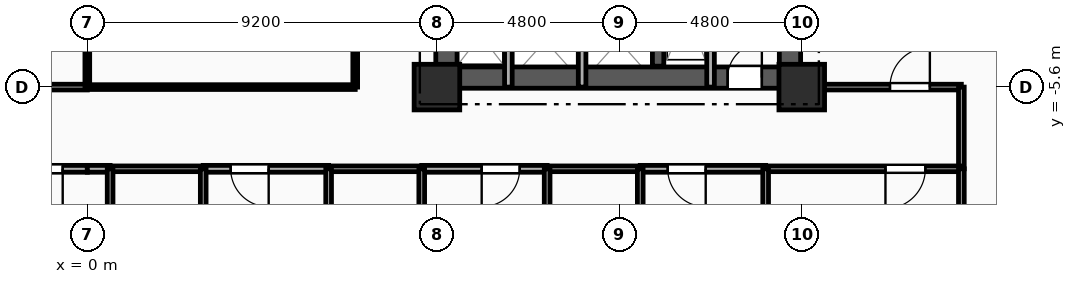
"""IFC4 building model, lengths in metres.
Left out: names, types, materials, properties, quantities, classifications, styles, units other than length and angle.
Written with IfcOpenShell. Run it as: python <this file> out.ifc"""

import sys

from ifc_helpers import new_model, si_unit, direction, frame, frame_2d, origin, origin_2d, place, context, subcontext, project, spatial, rectangle, extrude, element, fill, save


model = new_model("IFC4")
c1 = context("Model", 3, precision=1e-05, world=origin(), true_north=direction((0.0, 1.0)))
c2 = subcontext(c1, "Body", "Model", "MODEL_VIEW")
j1 = project(units=[si_unit("LENGTHUNIT", "METRE"), si_unit("PLANEANGLEUNIT", "RADIAN")], contexts=[c1])
p1 = place(None, origin())
s1 = spatial("IfcSite", under=j1, at=p1, CompositionType="ELEMENT")
p2 = place(p1, origin())
s2 = spatial("IfcBuilding", under=s1, at=p2, CompositionType="ELEMENT")
p3 = place(p2, frame((0.0, 0.0, 70.55)))
s3 = spatial("IfcBuildingStorey", under=s2, at=p3, CompositionType="ELEMENT", Elevation=70.55)
for number, where, z_axis, x_axis in (
    (1, (9.2, -5.6, 0.0), (0.0, 0.0, 1.0), (1.0, 0.0, 0.0)),
    (2, (18.8, -5.6, 0.0), (0.0, 0.0, 1.0), (1.0, 0.0, 0.0)),
):
    element("IfcColumn", number, at=place(p3, frame(where, z_axis=z_axis, x_axis=x_axis)), inside=s3, PredefinedType="COLUMN", context=c2, shape_type="SweptSolid", body=[
        extrude(rectangle(XDim=1.2, YDim=1.2, at=origin_2d()), origin(), (0.0, 0.0, 1.0), 3.35),
    ])
p4 = place(p3, frame((9.2, -5.35, 0.0), z_axis=(0.0, 0.0, 1.0), x_axis=(1.0, 0.0, 0.0)))
e3 = element("IfcWall", 3, at=p4, inside=s3, PredefinedType="SHEAR", context=c2, shape_type="SweptSolid", body=[
    extrude(rectangle(XDim=9.6, YDim=0.56, at=frame_2d((4.8, 0.0))), origin(), (0.0, 0.0, 1.0), 3.0),
])
p5 = place(p4, frame((7.65, 0.0, 0.0)))
e4 = element("IfcOpeningElement", 4, at=p5, cuts=e3, PredefinedType="OPENING", context=c2, shape_type="SweptSolid", body=[
    extrude(rectangle(XDim=0.9, YDim=2.1, at=frame_2d((0.45, 1.05))), frame((0.0, 0.29, 0.0), z_axis=(0.0, -1.0, 0.0), x_axis=(1.0, 0.0, 0.0)), (0.0, 0.0, 1.0), 0.58),
])
p6 = place(p3, frame((9.45, -5.05, 0.0), z_axis=(0.0, 0.0, 1.0), x_axis=(0.0, 1.0, 0.0)))
e5 = element("IfcWall", 5, at=p6, inside=s3, PredefinedType="SHEAR", context=c2, shape_type="SweptSolid", body=[
    extrude(rectangle(XDim=10.1, YDim=0.56, at=frame_2d((5.05, 0.0))), origin(), (0.0, 0.0, 1.0), 3.0),
])
p7 = place(p6, frame((7.15, 0.0, 0.0)))
e6 = element("IfcOpeningElement", 6, at=p7, cuts=e5, PredefinedType="OPENING", context=c2, shape_type="SweptSolid", body=[
    extrude(rectangle(XDim=0.9, YDim=2.1, at=frame_2d((0.45, 1.05))), frame((0.0, 0.29, 0.0), z_axis=(0.0, -1.0, 0.0), x_axis=(1.0, 0.0, 0.0)), (0.0, 0.0, 1.0), 0.58),
])
p8 = place(p6, frame((2.4, 0.0, 0.0)))
e7 = element("IfcOpeningElement", 7, at=p8, cuts=e5, PredefinedType="OPENING", context=c2, shape_type="SweptSolid", body=[
    extrude(rectangle(XDim=1.2, YDim=2.15, at=frame_2d((0.6, 1.075))), frame((0.0, 0.29, 0.0), z_axis=(0.0, -1.0, 0.0), x_axis=(1.0, 0.0, 0.0)), (0.0, 0.0, 1.0), 0.58),
])
p9 = place(p3, frame((18.49, -5.05, 0.0), z_axis=(0.0, 0.0, 1.0), x_axis=(0.0, 1.0, 0.0)))
e8 = element("IfcWall", 8, at=p9, inside=s3, PredefinedType="SHEAR", context=c2, shape_type="SweptSolid", body=[
    extrude(rectangle(XDim=10.1, YDim=0.56, at=frame_2d((5.05, 0.0))), origin(), (0.0, 0.0, 1.0), 3.0),
])
p10 = place(p3, frame((15.02, -5.05, 0.0), z_axis=(0.0, 0.0, 1.0), x_axis=(0.0, 1.0, 0.0)))
e9 = element("IfcWall", 9, at=p10, inside=s3, PredefinedType="SHEAR", context=c2, shape_type="SweptSolid", body=[
    extrude(rectangle(XDim=10.1, YDim=0.3, at=frame_2d((5.05, 0.0))), origin(), (0.0, 0.0, 1.0), 3.0),
])
p11 = place(p3, frame((16.4, -2.11, 0.0), z_axis=(0.0, 0.0, 1.0), x_axis=(0.0, -1.0, 0.0)))
e10 = element("IfcWall", 10, at=p11, inside=s3, PredefinedType="PARTITIONING", context=c2, shape_type="SweptSolid", body=[
    extrude(rectangle(XDim=3.49, YDim=0.2, at=frame_2d((1.745, 0.0))), origin(), (0.0, 0.0, 1.0), 3.0),
])
for number, where, z_axis, x_axis in (
    (11, (11.08, -5.6, 0.0), (0.0, 0.0, 1.0), (0.0, 1.0, 0.0)),
    (12, (13.02, -5.6, 0.0), (0.0, 0.0, 1.0), (0.0, 1.0, 0.0)),
):
    element("IfcWall", number, at=place(p3, frame(where, z_axis=z_axis, x_axis=x_axis)), inside=s3, PredefinedType="PARTITIONING", context=c2, shape_type="SweptSolid", body=[
        extrude(rectangle(XDim=2.25, YDim=0.2, at=frame_2d((1.125, 0.0))), origin(), (0.0, 0.0, 1.0), 3.0),
    ])
p12 = place(p3, frame((0.0, -7.75, 0.0), z_axis=(0.0, 0.0, 1.0), x_axis=(-1.0, 0.0, 0.0)))
e13 = element("IfcWall", 13, at=p12, inside=s3, PredefinedType="PARTITIONING", context=c2, shape_type="SweptSolid", body=[
    extrude(rectangle(XDim=2.7, YDim=0.18, at=frame_2d((1.35, 0.0))), origin(), (0.0, 0.0, 1.0), 3.0),
])
p13 = place(p12, frame((0.647, 0.0, 0.0)))
e14 = element("IfcOpeningElement", 14, at=p13, cuts=e13, PredefinedType="OPENING", context=c2, shape_type="SweptSolid", body=[
    extrude(rectangle(XDim=1.0, YDim=2.15, at=frame_2d((0.5, 1.075))), frame((0.0, 0.1, 0.0), z_axis=(0.0, -1.0, 0.0), x_axis=(1.0, 0.0, 0.0)), (0.0, 0.0, 1.0), 0.2),
])
p14 = place(p3, frame((-7.05, -5.6, 0.0), z_axis=(0.0, 0.0, 1.0), x_axis=(1.0, 0.0, 0.0)))
e15 = element("IfcWall", 15, at=p14, inside=s3, PredefinedType="PARTITIONING", context=c2, shape_type="SweptSolid", body=[
    extrude(rectangle(XDim=7.05, YDim=0.15, at=frame_2d((3.525, 0.0))), origin(), (0.0, 0.0, 1.0), 2.485),
])
p15 = place(p3, frame((18.8, -5.6, 0.0), z_axis=(0.0, 0.0, 1.0), x_axis=(1.0, 0.0, 0.0)))
e16 = element("IfcWall", 16, at=p15, inside=s3, PredefinedType="PARTITIONING", context=c2, shape_type="SweptSolid", body=[
    extrude(rectangle(XDim=4.2, YDim=0.15, at=frame_2d((2.1, 0.0))), origin(), (0.0, 0.0, 1.0), 3.0),
])
p16 = place(p15, frame((2.321, 0.0, 0.0)))
e17 = element("IfcOpeningElement", 17, at=p16, cuts=e16, PredefinedType="OPENING", context=c2, shape_type="SweptSolid", body=[
    extrude(rectangle(XDim=1.05, YDim=2.15, at=frame_2d((0.525, 1.075))), frame((0.0, 0.085, 0.0), z_axis=(0.0, -1.0, 0.0), x_axis=(1.0, 0.0, 0.0)), (0.0, 0.0, 1.0), 0.17),
])
p17 = place(p3, frame((23.0, -5.6, 0.0), z_axis=(0.0, 0.0, 1.0), x_axis=(0.0, -1.0, 0.0)))
e18 = element("IfcWall", 18, at=p17, inside=s3, PredefinedType="PARTITIONING", context=c2, shape_type="SweptSolid", body=[
    extrude(rectangle(XDim=2.15, YDim=0.15, at=frame_2d((1.075, 0.0))), origin(), (0.0, 0.0, 1.0), 3.0),
])
p18 = place(p3, frame((0.6, -7.75, 0.0), z_axis=(0.0, 0.0, 1.0), x_axis=(-1.0, 0.0, 0.0)))
e19 = element("IfcWall", 19, at=p18, inside=s3, PredefinedType="PARTITIONING", context=c2, shape_type="SweptSolid", body=[
    extrude(rectangle(XDim=0.6, YDim=0.18, at=frame_2d((0.3, 0.0))), origin(), (0.0, 0.0, 1.0), 3.0),
])
p19 = place(p3, frame((6.35, -7.75, 0.0), z_axis=(0.0, 0.0, 1.0), x_axis=(-1.0, 0.0, 0.0)))
e20 = element("IfcWall", 20, at=p19, inside=s3, PredefinedType="PARTITIONING", context=c2, shape_type="SweptSolid", body=[
    extrude(rectangle(XDim=3.3, YDim=0.18, at=frame_2d((1.65, 0.0))), origin(), (0.0, 0.0, 1.0), 3.0),
])
p20 = place(p19, frame((1.577, 0.0, 0.0)))
e21 = element("IfcOpeningElement", 21, at=p20, cuts=e20, PredefinedType="OPENING", context=c2, shape_type="SweptSolid", body=[
    extrude(rectangle(XDim=1.0, YDim=2.15, at=frame_2d((0.5, 1.075))), frame((0.0, 0.1, 0.0), z_axis=(0.0, -1.0, 0.0), x_axis=(1.0, 0.0, 0.0)), (0.0, 0.0, 1.0), 0.2),
])
p21 = place(p3, frame((3.05, -7.75, 0.0), z_axis=(0.0, 0.0, 1.0), x_axis=(-1.0, 0.0, 0.0)))
e22 = element("IfcWall", 22, at=p21, inside=s3, PredefinedType="PLUMBINGWALL", context=c2, shape_type="SweptSolid", body=[
    extrude(rectangle(XDim=2.45, YDim=0.15, at=frame_2d((1.225, 0.0))), origin(), (0.0, 0.0, 1.0), 3.0),
])
p22 = place(p3, frame((12.1, -7.75, 0.0), z_axis=(0.0, 0.0, 1.0), x_axis=(-1.0, 0.0, 0.0)))
e23 = element("IfcWall", 23, at=p22, inside=s3, PredefinedType="PARTITIONING", context=c2, shape_type="SweptSolid", body=[
    extrude(rectangle(XDim=3.3, YDim=0.18, at=frame_2d((1.65, 0.0))), origin(), (0.0, 0.0, 1.0), 3.0),
])
p23 = place(p22, frame((0.722, 0.0, 0.0)))
e24 = element("IfcOpeningElement", 24, at=p23, cuts=e23, PredefinedType="OPENING", context=c2, shape_type="SweptSolid", body=[
    extrude(rectangle(XDim=1.0, YDim=2.15, at=frame_2d((0.5, 1.075))), frame((0.0, 0.1, 0.0), z_axis=(0.0, -1.0, 0.0), x_axis=(1.0, 0.0, 0.0)), (0.0, 0.0, 1.0), 0.2),
])
p24 = place(p3, frame((8.8, -7.75, 0.0), z_axis=(0.0, 0.0, 1.0), x_axis=(-1.0, 0.0, 0.0)))
e25 = element("IfcWall", 25, at=p24, inside=s3, PredefinedType="PLUMBINGWALL", context=c2, shape_type="SweptSolid", body=[
    extrude(rectangle(XDim=2.45, YDim=0.15, at=frame_2d((1.225, 0.0))), origin(), (0.0, 0.0, 1.0), 3.0),
])
p25 = place(p3, frame((17.85, -7.75, 0.0), z_axis=(0.0, 0.0, 1.0), x_axis=(-1.0, 0.0, 0.0)))
e26 = element("IfcWall", 26, at=p25, inside=s3, PredefinedType="PARTITIONING", context=c2, shape_type="SweptSolid", body=[
    extrude(rectangle(XDim=3.3, YDim=0.18, at=frame_2d((1.65, 0.0))), origin(), (0.0, 0.0, 1.0), 3.0),
])
p26 = place(p25, frame((1.577, 0.0, 0.0)))
e27 = element("IfcOpeningElement", 27, at=p26, cuts=e26, PredefinedType="OPENING", context=c2, shape_type="SweptSolid", body=[
    extrude(rectangle(XDim=1.0, YDim=2.15, at=frame_2d((0.5, 1.075))), frame((0.0, 0.1, 0.0), z_axis=(0.0, -1.0, 0.0), x_axis=(1.0, 0.0, 0.0)), (0.0, 0.0, 1.0), 0.2),
])
p27 = place(p3, frame((14.55, -7.75, 0.0), z_axis=(0.0, 0.0, 1.0), x_axis=(-1.0, 0.0, 0.0)))
e28 = element("IfcWall", 28, at=p27, inside=s3, PredefinedType="PLUMBINGWALL", context=c2, shape_type="SweptSolid", body=[
    extrude(rectangle(XDim=2.45, YDim=0.15, at=frame_2d((1.225, 0.0))), origin(), (0.0, 0.0, 1.0), 3.0),
])
p28 = place(p3, frame((23.0, -7.75, 0.0), z_axis=(0.0, 0.0, 1.0), x_axis=(-1.0, 0.0, 0.0)))
e29 = element("IfcWall", 29, at=p28, inside=s3, PredefinedType="PARTITIONING", context=c2, shape_type="SweptSolid", body=[
    extrude(rectangle(XDim=5.15, YDim=0.15, at=frame_2d((2.575, 0.0))), origin(), (0.0, 0.0, 1.0), 3.0),
])
p29 = place(p28, frame((0.948, 0.0, 0.0)))
e30 = element("IfcOpeningElement", 30, at=p29, cuts=e29, PredefinedType="OPENING", context=c2, shape_type="SweptSolid", body=[
    extrude(rectangle(XDim=1.05, YDim=2.15, at=frame_2d((0.525, 1.075))), frame((0.0, 0.085, 0.0), z_axis=(0.0, -1.0, 0.0), x_axis=(1.0, 0.0, 0.0)), (0.0, 0.0, 1.0), 0.17),
])
p30 = place(p3, frame((0.0, -5.6, 0.0), z_axis=(0.0, 0.0, 1.0), x_axis=(1.0, 0.0, 0.0)))
e31 = element("IfcWall", 31, at=p30, inside=s3, PredefinedType="PARTITIONING", context=c2, shape_type="SweptSolid", body=[
    extrude(rectangle(XDim=7.05, YDim=0.125, at=frame_2d((3.525, 0.0))), origin(), (0.0, 0.0, 1.0), 2.485),
])
p31 = place(p3, frame((7.05, -5.6, 0.0), z_axis=(0.0, 0.0, 1.0), x_axis=(0.0, 1.0, 0.0)))
e32 = element("IfcWall", 32, at=p31, inside=s3, PredefinedType="PARTITIONING", context=c2, shape_type="SweptSolid", body=[
    extrude(rectangle(XDim=14.1, YDim=0.125, at=frame_2d((7.05, 0.0))), origin(), (0.0, 0.0, 1.0), 3.0),
])
p32 = place(p31, frame((5.076, 0.0, 0.0)))
e33 = element("IfcOpeningElement", 33, at=p32, cuts=e32, PredefinedType="OPENING", context=c2, shape_type="SweptSolid", body=[
    extrude(rectangle(XDim=0.95, YDim=2.1, at=frame_2d((0.475, 1.05))), frame((0.0, 0.073, 0.0), z_axis=(0.0, -1.0, 0.0), x_axis=(1.0, 0.0, 0.0)), (0.0, 0.0, 1.0), 0.145),
])
p33 = place(p3, frame((23.0, -19.4, 0.0), z_axis=(0.0, 0.0, 1.0), x_axis=(0.0, 1.0, 0.0)))
e34 = element("IfcWall", 34, at=p33, inside=s3, PredefinedType="PARTITIONING", context=c2, shape_type="SweptSolid", body=[
    extrude(rectangle(XDim=11.65, YDim=0.15, at=frame_2d((5.825, 0.0))), origin(), (0.0, 0.0, 1.0), 3.0),
])
for number, where, z_axis, x_axis in (
    (35, (0.6, -7.75, 0.0), (0.0, 0.0, 1.0), (0.0, -1.0, 0.0)),
    (36, (3.05, -9.9, 0.0), (0.0, 0.0, 1.0), (0.0, 1.0, 0.0)),
    (37, (6.35, -7.75, 0.0), (0.0, 0.0, 1.0), (0.0, -1.0, 0.0)),
    (38, (8.8, -9.9, 0.0), (0.0, 0.0, 1.0), (0.0, 1.0, 0.0)),
    (39, (12.1, -7.75, 0.0), (0.0, 0.0, 1.0), (0.0, -1.0, 0.0)),
    (40, (14.55, -9.9, 0.0), (0.0, 0.0, 1.0), (0.0, 1.0, 0.0)),
):
    element("IfcWall", number, at=place(p3, frame(where, z_axis=z_axis, x_axis=x_axis)), inside=s3, PredefinedType="PLUMBINGWALL", context=c2, shape_type="SweptSolid", body=[
        extrude(rectangle(XDim=2.15, YDim=0.15, at=frame_2d((1.075, 0.0))), origin(), (0.0, 0.0, 1.0), 3.0),
    ])
p34 = place(p3, frame((17.85, -7.75, 0.0), z_axis=(0.0, 0.0, 1.0), x_axis=(0.0, -1.0, 0.0)))
e41 = element("IfcWall", 41, at=p34, inside=s3, PredefinedType="PARTITIONING", context=c2, shape_type="SweptSolid", body=[
    extrude(rectangle(XDim=11.65, YDim=0.15, at=frame_2d((5.825, 0.0))), origin(), (0.0, 0.0, 1.0), 3.0),
])
p35 = place(p3, frame((0.0, 8.5, 0.0), z_axis=(0.0, 0.0, 1.0), x_axis=(0.0, -1.0, 0.0)))
e42 = element("IfcWall", 42, at=p35, inside=s3, PredefinedType="PARTITIONING", context=c2, shape_type="SweptSolid", body=[
    extrude(rectangle(XDim=14.1, YDim=0.125, at=frame_2d((7.05, 0.0))), origin(), (0.0, 0.0, 1.0), 3.0),
])
p36 = place(p5, origin())
e43 = element("IfcDoor", 43, at=p36, inside=s3, OperationType="SINGLE_SWING_RIGHT", PredefinedType="DOOR", context=c2, shape_type="SweptSolid", body=[
    extrude(rectangle(XDim=0.9, YDim=2.1, at=frame_2d((0.45, 1.05))), frame((0.0, 0.025, 0.0), z_axis=(0.0, -1.0, 0.0), x_axis=(1.0, 0.0, 0.0)), (0.0, 0.0, 1.0), 0.05),
])
fill(e4, e43)
p37 = place(p13, origin())
e44 = element("IfcDoor", 44, at=p37, inside=s3, OperationType="SINGLE_SWING_LEFT", PredefinedType="DOOR", context=c2, shape_type="SweptSolid", body=[
    extrude(rectangle(XDim=1.0, YDim=2.15, at=frame_2d((0.5, 1.075))), frame((0.0, 0.025, 0.0), z_axis=(0.0, -1.0, 0.0), x_axis=(1.0, 0.0, 0.0)), (0.0, 0.0, 1.0), 0.05),
])
fill(e14, e44)
p38 = place(p16, origin())
e45 = element("IfcDoor", 45, at=p38, inside=s3, OperationType="SINGLE_SWING_RIGHT", PredefinedType="DOOR", context=c2, shape_type="SweptSolid", body=[
    extrude(rectangle(XDim=1.05, YDim=2.15, at=frame_2d((0.525, 1.075))), frame((0.0, 0.025, 0.0), z_axis=(0.0, -1.0, 0.0), x_axis=(1.0, 0.0, 0.0)), (0.0, 0.0, 1.0), 0.05),
])
fill(e17, e45)
p39 = place(p20, origin())
e46 = element("IfcDoor", 46, at=p39, inside=s3, OperationType="SINGLE_SWING_LEFT", PredefinedType="DOOR", context=c2, shape_type="SweptSolid", body=[
    extrude(rectangle(XDim=1.0, YDim=2.15, at=frame_2d((0.5, 1.075))), frame((0.0, 0.025, 0.0), z_axis=(0.0, -1.0, 0.0), x_axis=(1.0, 0.0, 0.0)), (0.0, 0.0, 1.0), 0.05),
])
fill(e21, e46)
p40 = place(p23, origin())
e47 = element("IfcDoor", 47, at=p40, inside=s3, OperationType="SINGLE_SWING_RIGHT", PredefinedType="DOOR", context=c2, shape_type="SweptSolid", body=[
    extrude(rectangle(XDim=1.0, YDim=2.15, at=frame_2d((0.5, 1.075))), frame((0.0, 0.025, 0.0), z_axis=(0.0, -1.0, 0.0), x_axis=(1.0, 0.0, 0.0)), (0.0, 0.0, 1.0), 0.05),
])
fill(e24, e47)
p41 = place(p26, origin())
e48 = element("IfcDoor", 48, at=p41, inside=s3, OperationType="SINGLE_SWING_LEFT", PredefinedType="DOOR", context=c2, shape_type="SweptSolid", body=[
    extrude(rectangle(XDim=1.0, YDim=2.15, at=frame_2d((0.5, 1.075))), frame((0.0, 0.025, 0.0), z_axis=(0.0, -1.0, 0.0), x_axis=(1.0, 0.0, 0.0)), (0.0, 0.0, 1.0), 0.05),
])
fill(e27, e48)
p42 = place(p29, origin())
e49 = element("IfcDoor", 49, at=p42, inside=s3, OperationType="SINGLE_SWING_RIGHT", PredefinedType="DOOR", context=c2, shape_type="SweptSolid", body=[
    extrude(rectangle(XDim=1.05, YDim=2.15, at=frame_2d((0.525, 1.075))), frame((0.0, 0.025, 0.0), z_axis=(0.0, -1.0, 0.0), x_axis=(1.0, 0.0, 0.0)), (0.0, 0.0, 1.0), 0.05),
])
fill(e30, e49)
save(model, sys.argv[1])
